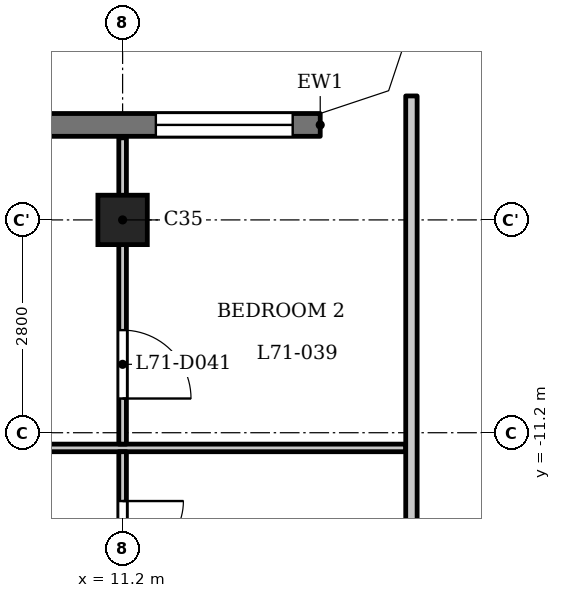
"""IFC4 building model, lengths in metres.
Left out: names, types, materials, properties, quantities, classifications, styles, units other than length and angle.
Written with IfcOpenShell. Run it as: python <this file> out.ifc"""

import sys

from ifc_helpers import new_model, si_unit, direction, frame, frame_2d, origin, origin_2d, place, context, subcontext, project, spatial, polyline, rectangle, outline, extrude, element, fill, save


model = new_model("IFC4")
c1 = context("Model", 3, precision=1e-05, world=origin(), true_north=direction((0.0, 1.0)))
c2 = subcontext(c1, "Body", "Model", "MODEL_VIEW")
j1 = project(units=[si_unit("LENGTHUNIT", "METRE"), si_unit("PLANEANGLEUNIT", "RADIAN")], contexts=[c1])
p1 = place(None, origin())
s1 = spatial("IfcSite", under=j1, at=p1, CompositionType="ELEMENT")
p2 = place(p1, origin())
s2 = spatial("IfcBuilding", under=s1, at=p2, CompositionType="ELEMENT")
p3 = place(p2, frame((0.0, 0.0, 273.2)))
s3 = spatial("IfcBuildingStorey", under=s2, at=p3, CompositionType="ELEMENT", Elevation=273.2)
p4 = place(p3, frame((11.2, -8.4, 0.0), z_axis=(0.0, 0.0, 1.0), x_axis=(1.0, 0.0, 0.0)))
e1 = element("IfcColumn", 1, at=p4, inside=s3, PredefinedType="COLUMN", context=c2, shape_type="SweptSolid", body=[
    extrude(rectangle(XDim=0.65, YDim=0.65, at=origin_2d()), origin(), (0.0, 0.0, 1.0), 3.5),
])
p5 = place(p3, frame((13.8, -7.15, 0.0), z_axis=(0.0, 0.0, 1.0), x_axis=(-1.0, 0.0, 0.0)))
e2 = element("IfcWall", 2, at=p5, inside=s3, PredefinedType="SOLIDWALL", context=c2, shape_type="SweptSolid", body=[
    extrude(rectangle(XDim=27.6, YDim=0.3, at=frame_2d((13.8, 0.0))), origin(), (0.0, 0.0, 1.0), 3.2),
])
p6 = place(p5, frame((0.363, 0.0, 0.9)))
e3 = element("IfcOpeningElement", 3, at=p6, cuts=e2, PredefinedType="OPENING", context=c2, shape_type="SweptSolid", body=[
    extrude(rectangle(XDim=1.8, YDim=1.25, at=frame_2d((0.9, 0.625))), frame((0.0, 0.16, 0.0), z_axis=(0.0, -1.0, 0.0), x_axis=(1.0, 0.0, 0.0)), (0.0, 0.0, 1.0), 0.32),
])
p7 = place(p5, frame((3.6, 0.0, 1.2)))
e4 = element("IfcOpeningElement", 4, at=p7, cuts=e2, PredefinedType="OPENING", context=c2, shape_type="SweptSolid", body=[
    extrude(rectangle(XDim=3.6, YDim=0.95, at=frame_2d((1.8, 0.475))), frame((0.0, 0.16, 0.0), z_axis=(0.0, -1.0, 0.0), x_axis=(1.0, 0.0, 0.0)), (0.0, 0.0, 1.0), 0.32),
])
p8 = place(p5, frame((9.2, 0.0, 1.2)))
e5 = element("IfcOpeningElement", 5, at=p8, cuts=e2, PredefinedType="OPENING", context=c2, shape_type="SweptSolid", body=[
    extrude(rectangle(XDim=3.6, YDim=0.95, at=frame_2d((1.8, 0.475))), frame((0.0, 0.16, 0.0), z_axis=(0.0, -1.0, 0.0), x_axis=(1.0, 0.0, 0.0)), (0.0, 0.0, 1.0), 0.32),
])
p9 = place(p5, frame((14.8, 0.0, 1.2)))
e6 = element("IfcOpeningElement", 6, at=p9, cuts=e2, PredefinedType="OPENING", context=c2, shape_type="SweptSolid", body=[
    extrude(rectangle(XDim=3.6, YDim=0.95, at=frame_2d((1.8, 0.475))), frame((0.0, 0.16, 0.0), z_axis=(0.0, -1.0, 0.0), x_axis=(1.0, 0.0, 0.0)), (0.0, 0.0, 1.0), 0.32),
])
p10 = place(p5, frame((20.4, 0.0, 1.2)))
e7 = element("IfcOpeningElement", 7, at=p10, cuts=e2, PredefinedType="OPENING", context=c2, shape_type="SweptSolid", body=[
    extrude(rectangle(XDim=3.6, YDim=0.95, at=frame_2d((1.8, 0.475))), frame((0.0, 0.16, 0.0), z_axis=(0.0, -1.0, 0.0), x_axis=(1.0, 0.0, 0.0)), (0.0, 0.0, 1.0), 0.32),
])
p11 = place(p5, frame((25.438, 0.0, 0.9)))
e8 = element("IfcOpeningElement", 8, at=p11, cuts=e2, PredefinedType="OPENING", context=c2, shape_type="SweptSolid", body=[
    extrude(rectangle(XDim=1.8, YDim=1.25, at=frame_2d((0.9, 0.625))), frame((0.0, 0.16, 0.0), z_axis=(0.0, -1.0, 0.0), x_axis=(1.0, 0.0, 0.0)), (0.0, 0.0, 1.0), 0.32),
])
p12 = place(p3, frame((-14.925, -11.4, 0.0), z_axis=(0.0, 0.0, 1.0), x_axis=(1.0, 0.0, 0.0)))
e9 = element("IfcWall", 9, at=p12, inside=s3, PredefinedType="PARTITIONING", context=c2, shape_type="SweptSolid", body=[
    extrude(rectangle(XDim=29.85, YDim=0.1, at=frame_2d((14.925, 0.0))), origin(), (0.0, 0.0, 1.0), 3.2),
])
p13 = place(p12, frame((13.375, 0.0, 0.0)))
e10 = element("IfcOpeningElement", 10, at=p13, cuts=e9, PredefinedType="OPENING", context=c2, shape_type="SweptSolid", body=[
    extrude(rectangle(XDim=0.9, YDim=2.1, at=frame_2d((0.45, 1.05))), frame((0.0, 0.06, 0.0), z_axis=(0.0, -1.0, 0.0), x_axis=(1.0, 0.0, 0.0)), (0.0, 0.0, 1.0), 0.12),
])
p14 = place(p12, frame((4.775, 0.0, 0.0)))
e11 = element("IfcOpeningElement", 11, at=p14, cuts=e9, PredefinedType="OPENING", context=c2, shape_type="SweptSolid", body=[
    extrude(rectangle(XDim=0.9, YDim=2.1, at=frame_2d((0.45, 1.05))), frame((0.0, 0.06, 0.0), z_axis=(0.0, -1.0, 0.0), x_axis=(1.0, 0.0, 0.0)), (0.0, 0.0, 1.0), 0.12),
])
p15 = place(p12, frame((18.475, 0.0, 0.0)))
e12 = element("IfcOpeningElement", 12, at=p15, cuts=e9, PredefinedType="OPENING", context=c2, shape_type="SweptSolid", body=[
    extrude(rectangle(XDim=0.9, YDim=2.1, at=frame_2d((0.45, 1.05))), frame((0.0, 0.06, 0.0), z_axis=(0.0, -1.0, 0.0), x_axis=(1.0, 0.0, 0.0)), (0.0, 0.0, 1.0), 0.12),
])
p16 = place(p12, frame((21.825, 0.0, 0.0)))
e13 = element("IfcOpeningElement", 13, at=p16, cuts=e9, PredefinedType="OPENING", context=c2, shape_type="SweptSolid", body=[
    extrude(rectangle(XDim=0.9, YDim=2.1, at=frame_2d((0.45, 1.05))), frame((0.0, 0.06, 0.0), z_axis=(0.0, -1.0, 0.0), x_axis=(1.0, 0.0, 0.0)), (0.0, 0.0, 1.0), 0.12),
])
p17 = place(p3, frame((11.2, -13.725, 0.0), z_axis=(0.0, 0.0, 1.0), x_axis=(0.0, 1.0, 0.0)))
e14 = element("IfcWall", 14, at=p17, inside=s3, PredefinedType="PARTITIONING", context=c2, shape_type="SweptSolid", body=[
    extrude(rectangle(XDim=2.275, YDim=0.1, at=frame_2d((1.138, 0.0))), origin(), (0.0, 0.0, 1.0), 3.2),
])
p18 = place(p17, frame((0.826, 0.0, 0.0)))
e15 = element("IfcOpeningElement", 15, at=p18, cuts=e14, PredefinedType="OPENING", context=c2, shape_type="SweptSolid", body=[
    extrude(rectangle(XDim=0.8, YDim=2.1, at=frame_2d((0.4, 1.05))), frame((0.0, 0.06, 0.0), z_axis=(0.0, -1.0, 0.0), x_axis=(1.0, 0.0, 0.0)), (0.0, 0.0, 1.0), 0.12),
])
p19 = place(p3, frame((11.2, -11.35, 0.0), z_axis=(0.0, 0.0, 1.0), x_axis=(0.0, 1.0, 0.0)))
e16 = element("IfcWall", 16, at=p19, inside=s3, PredefinedType="PARTITIONING", context=c2, shape_type="SweptSolid", body=[
    extrude(rectangle(XDim=4.03, YDim=0.1, at=frame_2d((2.015, 0.0))), origin(), (0.0, 0.0, 1.0), 3.2),
])
p20 = place(p19, frame((0.6, 0.0, 0.0)))
e17 = element("IfcOpeningElement", 17, at=p20, cuts=e16, PredefinedType="OPENING", context=c2, shape_type="SweptSolid", body=[
    extrude(rectangle(XDim=0.9, YDim=2.1, at=frame_2d((0.45, 1.05))), frame((0.0, 0.06, 0.0), z_axis=(0.0, -1.0, 0.0), x_axis=(1.0, 0.0, 0.0)), (0.0, 0.0, 1.0), 0.12),
])
p21 = place(p3, frame((15.0, -13.725, 0.0), z_axis=(0.0, 0.0, 1.0), x_axis=(0.0, 1.0, 0.0)))
e18 = element("IfcWall", 18, at=p21, inside=s3, PredefinedType="PARTITIONING", context=c2, shape_type="SweptSolid", body=[
    extrude(rectangle(XDim=6.956, YDim=0.15, at=frame_2d((3.478, 0.0))), origin(), (0.0, 0.0, 1.0), 3.2),
])
p22 = place(p3, origin())
e19 = element("IfcWall", 19, at=p22, inside=s3, PredefinedType="SOLIDWALL", context=c2, shape_type="SweptSolid", body=[
    extrude(outline(polyline([(14.937, -6.937), (15.3, -5.849), (15.3, -5.8), (15.0, -5.8), (14.7, -6.7), (13.8, -7.0), (13.8, -7.3), (13.849, -7.3), (14.937, -6.937)])), origin(), (0.0, 0.0, 1.0), 3.2),
])
p23 = place(p18, origin())
e20 = element("IfcDoor", 20, at=p23, inside=s3, OperationType="SINGLE_SWING_RIGHT", PredefinedType="DOOR", context=c2, shape_type="SweptSolid", body=[
    extrude(rectangle(XDim=0.8, YDim=2.1, at=frame_2d((0.4, 1.05))), frame((0.0, 0.025, 0.0), z_axis=(0.0, -1.0, 0.0), x_axis=(1.0, 0.0, 0.0)), (0.0, 0.0, 1.0), 0.05),
])
fill(e15, e20)
p24 = place(p20, origin())
e21 = element("IfcDoor", 21, at=p24, inside=s3, OperationType="SINGLE_SWING_LEFT", PredefinedType="DOOR", context=c2, shape_type="SweptSolid", body=[
    extrude(rectangle(XDim=0.9, YDim=2.1, at=frame_2d((0.45, 1.05))), frame((0.0, 0.025, 0.0), z_axis=(0.0, -1.0, 0.0), x_axis=(1.0, 0.0, 0.0)), (0.0, 0.0, 1.0), 0.05),
])
fill(e17, e21)
p25 = place(p6, origin())
e22 = element("IfcWindow", 22, at=p25, inside=s3, PartitioningType="SINGLE_PANEL", PredefinedType="WINDOW", context=c2, shape_type="SweptSolid", body=[
    extrude(rectangle(XDim=1.8, YDim=1.25, at=frame_2d((0.9, 0.625))), frame((0.0, 0.03, 0.0), z_axis=(0.0, -1.0, 0.0), x_axis=(1.0, 0.0, 0.0)), (0.0, 0.0, 1.0), 0.06),
])
fill(e3, e22)
save(model, sys.argv[1])
